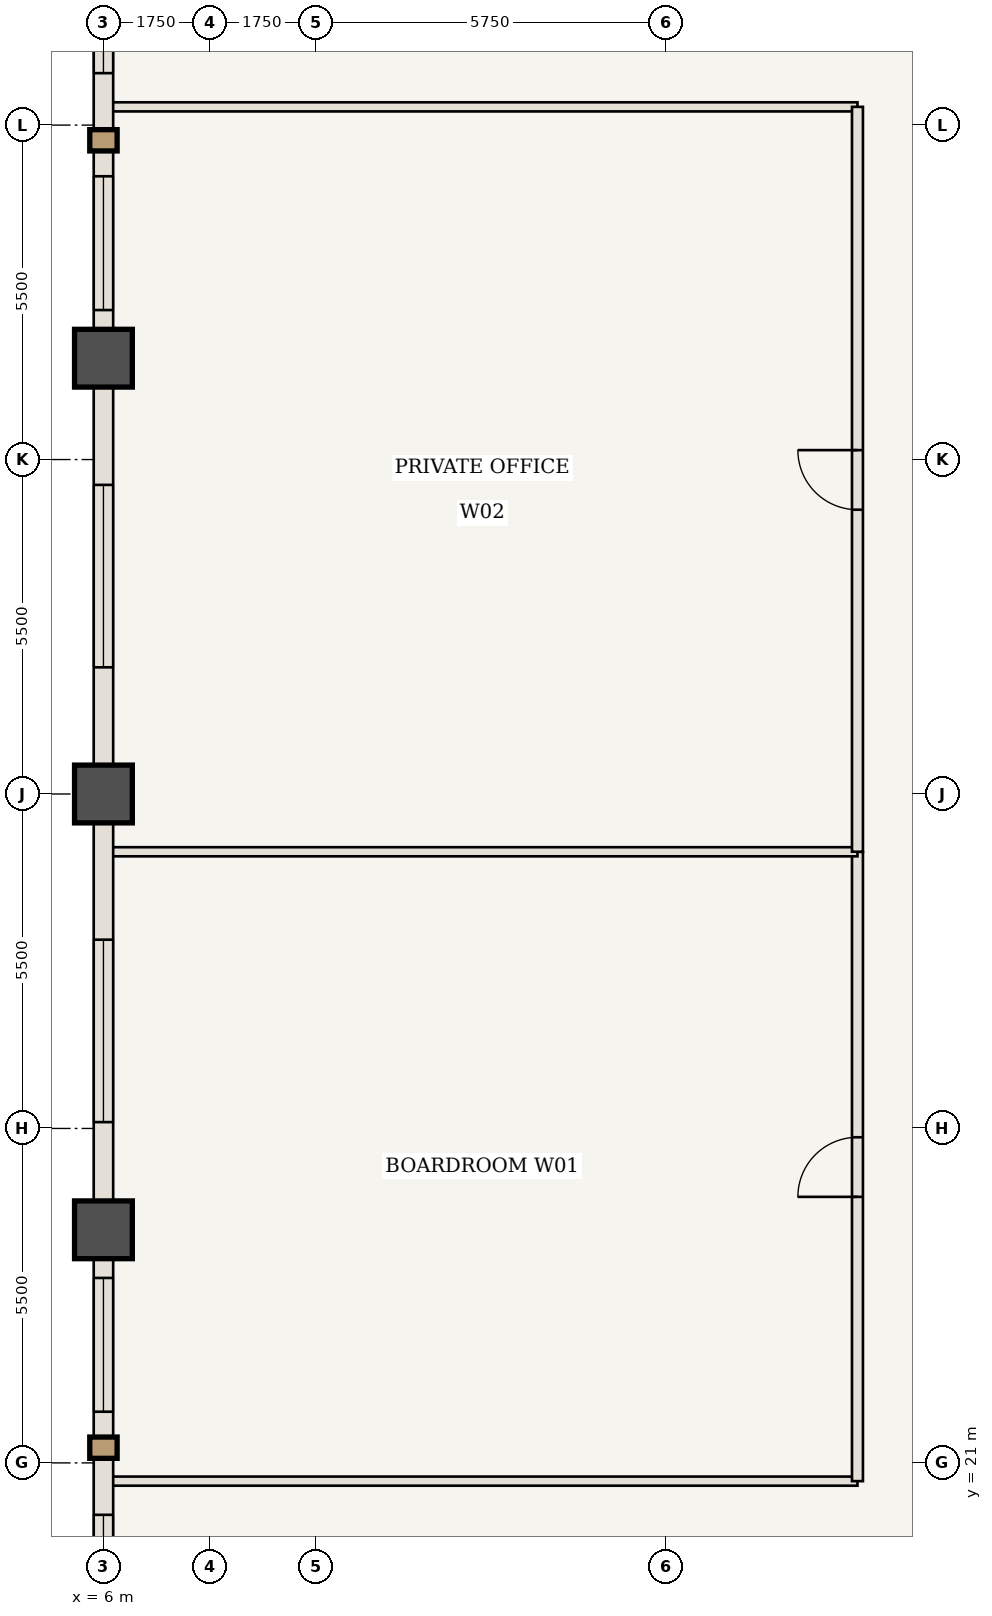
"""IFC4 building model, lengths in metres.
Left out: names, types, materials, properties, quantities, classifications, styles, units other than length and angle.
Written with IfcOpenShell. Run it as: python <this file> out.ifc"""

import sys

from ifc_helpers import new_model, si_unit, direction, frame, frame_2d, origin, origin_2d, place, context, subcontext, project, spatial, rectangle, extrude, element, fill, save


model = new_model("IFC4")
c1 = context("Model", 3, precision=1e-05, world=origin(), true_north=direction((0.0, 1.0)))
c2 = subcontext(c1, "Body", "Model", "MODEL_VIEW")
j1 = project(units=[si_unit("LENGTHUNIT", "METRE"), si_unit("PLANEANGLEUNIT", "RADIAN")], contexts=[c1])
p1 = place(None, origin())
s1 = spatial("IfcSite", under=j1, at=p1, CompositionType="ELEMENT")
p2 = place(p1, origin())
s2 = spatial("IfcBuilding", under=s1, at=p2, CompositionType="ELEMENT")
p3 = place(p2, frame((0.0, 0.0, 114.45)))
s3 = spatial("IfcBuildingStorey", under=s2, at=p3, CompositionType="ELEMENT", Elevation=114.45)
for number, where, z_axis, x_axis in (
    (1, (6.0, 24.833, 0.0), (0.0, 0.0, 1.0), (1.0, 0.0, 0.0)),
    (2, (6.0, 32.0, 0.0), (0.0, 0.0, 1.0), (1.0, 0.0, 0.0)),
    (3, (6.0, 39.167, 0.0), (0.0, 0.0, 1.0), (1.0, 0.0, 0.0)),
):
    element("IfcColumn", number, at=place(p3, frame(where, z_axis=z_axis, x_axis=x_axis)), inside=s3, PredefinedType="COLUMN", context=c2, shape_type="SweptSolid", body=[
        extrude(rectangle(XDim=0.95, YDim=0.95, at=origin_2d()), origin(), (0.0, 0.0, 1.0), 3.85),
    ])
for number, where, z_axis, x_axis in (
    (4, (6.06, 20.7, 0.0), (0.0, 0.0, 1.0), (1.0, 0.0, 0.0)),
    (5, (6.06, 43.3, 0.0), (0.0, 0.0, 1.0), (1.0, 0.0, 0.0)),
):
    element("IfcWall", number, at=place(p3, frame(where, z_axis=z_axis, x_axis=x_axis)), inside=s3, PredefinedType="STANDARD", context=c2, shape_type="SweptSolid", body=[
        extrude(rectangle(XDim=12.34, YDim=0.15, at=frame_2d((6.17, 0.0))), origin(), (0.0, 0.0, 1.0), 3.065),
    ])
p4 = place(p3, frame((18.4, 20.7, 0.0), z_axis=(0.0, 0.0, 1.0), x_axis=(0.0, 1.0, 0.0)))
e6 = element("IfcWall", 6, at=p4, inside=s3, PredefinedType="STANDARD", context=c2, shape_type="SweptSolid", body=[
    extrude(rectangle(XDim=10.35, YDim=0.18, at=frame_2d((5.175, 0.0))), origin(), (0.0, 0.0, 1.0), 3.685),
])
p5 = place(p4, frame((4.675, 0.0, 0.0)))
e7 = element("IfcOpeningElement", 7, at=p5, cuts=e6, PredefinedType="OPENING", context=c2, shape_type="SweptSolid", body=[
    extrude(rectangle(XDim=0.98, YDim=2.2, at=frame_2d((0.49, 1.1))), frame((0.0, 0.1, 0.0), z_axis=(0.0, -1.0, 0.0), x_axis=(1.0, 0.0, 0.0)), (0.0, 0.0, 1.0), 0.2),
])
p6 = place(p3, frame((6.06, 31.05, 0.0), z_axis=(0.0, 0.0, 1.0), x_axis=(1.0, 0.0, 0.0)))
e8 = element("IfcWall", 8, at=p6, inside=s3, PredefinedType="STANDARD", context=c2, shape_type="SweptSolid", body=[
    extrude(rectangle(XDim=12.34, YDim=0.15, at=frame_2d((6.17, 0.0))), origin(), (0.0, 0.0, 1.0), 3.685),
])
p7 = place(p3, frame((18.4, 31.05, 0.0), z_axis=(0.0, 0.0, 1.0), x_axis=(0.0, 1.0, 0.0)))
e9 = element("IfcWall", 9, at=p7, inside=s3, PredefinedType="STANDARD", context=c2, shape_type="SweptSolid", body=[
    extrude(rectangle(XDim=12.25, YDim=0.18, at=frame_2d((6.125, 0.0))), origin(), (0.0, 0.0, 1.0), 3.685),
])
p8 = place(p7, frame((5.625, 0.0, 0.0)))
e10 = element("IfcOpeningElement", 10, at=p8, cuts=e9, PredefinedType="OPENING", context=c2, shape_type="SweptSolid", body=[
    extrude(rectangle(XDim=0.98, YDim=2.2, at=frame_2d((0.49, 1.1))), frame((0.0, 0.1, 0.0), z_axis=(0.0, -1.0, 0.0), x_axis=(1.0, 0.0, 0.0)), (0.0, 0.0, 1.0), 0.2),
])
p9 = place(p3, frame((6.0, 17.667, 0.0), z_axis=(0.0, 0.0, 1.0), x_axis=(0.0, 1.0, 0.0)))
e11 = element("IfcWall", 11, at=p9, inside=s3, PredefinedType="USERDEFINED", context=c2, shape_type="SweptSolid", body=[
    extrude(rectangle(XDim=7.167, YDim=0.32, at=frame_2d((3.583, 0.0))), origin(), (0.0, 0.0, 1.0), 2.885),
])
p10 = place(p9, frame((0.879, 0.0, 0.85)))
e12 = element("IfcOpeningElement", 12, at=p10, cuts=e11, PredefinedType="OPENING", context=c2, shape_type="SweptSolid", body=[
    extrude(rectangle(XDim=1.6, YDim=1.835, at=frame_2d((0.8, 0.917))), frame((0.0, 0.17, 0.0), z_axis=(0.0, -1.0, 0.0), x_axis=(1.0, 0.0, 0.0)), (0.0, 0.0, 1.0), 0.34),
])
p11 = place(p9, frame((4.175, 0.0, 0.85)))
e13 = element("IfcOpeningElement", 13, at=p11, cuts=e11, PredefinedType="OPENING", context=c2, shape_type="SweptSolid", body=[
    extrude(rectangle(XDim=2.2, YDim=1.835, at=frame_2d((1.1, 0.917))), frame((0.0, 0.17, 0.0), z_axis=(0.0, -1.0, 0.0), x_axis=(1.0, 0.0, 0.0)), (0.0, 0.0, 1.0), 0.34),
])
p12 = place(p3, frame((6.0, 24.833, 0.0), z_axis=(0.0, 0.0, 1.0), x_axis=(0.0, 1.0, 0.0)))
e14 = element("IfcWall", 14, at=p12, inside=s3, PredefinedType="USERDEFINED", context=c2, shape_type="SweptSolid", body=[
    extrude(rectangle(XDim=7.167, YDim=0.32, at=frame_2d((3.583, 0.0))), origin(), (0.0, 0.0, 1.0), 2.885),
])
p13 = place(p12, frame((1.771, 0.0, 0.85)))
e15 = element("IfcOpeningElement", 15, at=p13, cuts=e14, PredefinedType="OPENING", context=c2, shape_type="SweptSolid", body=[
    extrude(rectangle(XDim=3.0, YDim=1.835, at=frame_2d((1.5, 0.917))), frame((0.0, 0.17, 0.0), z_axis=(0.0, -1.0, 0.0), x_axis=(1.0, 0.0, 0.0)), (0.0, 0.0, 1.0), 0.34),
])
p14 = place(p3, frame((6.0, 32.0, 0.0), z_axis=(0.0, 0.0, 1.0), x_axis=(0.0, 1.0, 0.0)))
e16 = element("IfcWall", 16, at=p14, inside=s3, PredefinedType="USERDEFINED", context=c2, shape_type="SweptSolid", body=[
    extrude(rectangle(XDim=7.167, YDim=0.32, at=frame_2d((3.583, 0.0))), origin(), (0.0, 0.0, 1.0), 2.885),
])
p15 = place(p14, frame((2.083, 0.0, 0.85)))
e17 = element("IfcOpeningElement", 17, at=p15, cuts=e16, PredefinedType="OPENING", context=c2, shape_type="SweptSolid", body=[
    extrude(rectangle(XDim=3.0, YDim=1.835, at=frame_2d((1.5, 0.917))), frame((0.0, 0.17, 0.0), z_axis=(0.0, -1.0, 0.0), x_axis=(1.0, 0.0, 0.0)), (0.0, 0.0, 1.0), 0.34),
])
p16 = place(p3, frame((6.0, 39.167, 0.0), z_axis=(0.0, 0.0, 1.0), x_axis=(0.0, 1.0, 0.0)))
e18 = element("IfcWall", 18, at=p16, inside=s3, PredefinedType="USERDEFINED", context=c2, shape_type="SweptSolid", body=[
    extrude(rectangle(XDim=7.167, YDim=0.32, at=frame_2d((3.583, 0.0))), origin(), (0.0, 0.0, 1.0), 2.885),
])
p17 = place(p16, frame((0.792, 0.0, 0.85)))
e19 = element("IfcOpeningElement", 19, at=p17, cuts=e18, PredefinedType="OPENING", context=c2, shape_type="SweptSolid", body=[
    extrude(rectangle(XDim=2.2, YDim=1.835, at=frame_2d((1.1, 0.917))), frame((0.0, 0.17, 0.0), z_axis=(0.0, -1.0, 0.0), x_axis=(1.0, 0.0, 0.0)), (0.0, 0.0, 1.0), 0.34),
])
p18 = place(p16, frame((4.688, 0.0, 0.85)))
e20 = element("IfcOpeningElement", 20, at=p18, cuts=e18, PredefinedType="OPENING", context=c2, shape_type="SweptSolid", body=[
    extrude(rectangle(XDim=1.6, YDim=1.835, at=frame_2d((0.8, 0.917))), frame((0.0, 0.17, 0.0), z_axis=(0.0, -1.0, 0.0), x_axis=(1.0, 0.0, 0.0)), (0.0, 0.0, 1.0), 0.34),
])
p19 = place(p5, origin())
e21 = element("IfcDoor", 21, at=p19, inside=s3, OperationType="SINGLE_SWING_LEFT", PredefinedType="DOOR", context=c2, shape_type="SweptSolid", body=[
    extrude(rectangle(XDim=0.98, YDim=2.2, at=frame_2d((0.49, 1.1))), frame((0.0, 0.025, 0.0), z_axis=(0.0, -1.0, 0.0), x_axis=(1.0, 0.0, 0.0)), (0.0, 0.0, 1.0), 0.05),
])
fill(e7, e21)
p20 = place(p8, origin())
e22 = element("IfcDoor", 22, at=p20, inside=s3, OperationType="SINGLE_SWING_RIGHT", PredefinedType="DOOR", context=c2, shape_type="SweptSolid", body=[
    extrude(rectangle(XDim=0.98, YDim=2.2, at=frame_2d((0.49, 1.1))), frame((0.0, 0.025, 0.0), z_axis=(0.0, -1.0, 0.0), x_axis=(1.0, 0.0, 0.0)), (0.0, 0.0, 1.0), 0.05),
])
fill(e10, e22)
p21 = place(p10, origin())
e23 = element("IfcWindow", 23, at=p21, inside=s3, PartitioningType="SINGLE_PANEL", PredefinedType="WINDOW", context=c2, shape_type="SweptSolid", body=[
    extrude(rectangle(XDim=1.6, YDim=1.835, at=frame_2d((0.8, 0.917))), frame((0.0, 0.03, 0.0), z_axis=(0.0, -1.0, 0.0), x_axis=(1.0, 0.0, 0.0)), (0.0, 0.0, 1.0), 0.06),
])
fill(e12, e23)
p22 = place(p11, origin())
e24 = element("IfcWindow", 24, at=p22, inside=s3, PartitioningType="SINGLE_PANEL", PredefinedType="WINDOW", context=c2, shape_type="SweptSolid", body=[
    extrude(rectangle(XDim=2.2, YDim=1.835, at=frame_2d((1.1, 0.917))), frame((0.0, 0.03, 0.0), z_axis=(0.0, -1.0, 0.0), x_axis=(1.0, 0.0, 0.0)), (0.0, 0.0, 1.0), 0.06),
])
fill(e13, e24)
p23 = place(p13, origin())
e25 = element("IfcWindow", 25, at=p23, inside=s3, PartitioningType="SINGLE_PANEL", PredefinedType="WINDOW", context=c2, shape_type="SweptSolid", body=[
    extrude(rectangle(XDim=3.0, YDim=1.835, at=frame_2d((1.5, 0.917))), frame((0.0, 0.03, 0.0), z_axis=(0.0, -1.0, 0.0), x_axis=(1.0, 0.0, 0.0)), (0.0, 0.0, 1.0), 0.06),
])
fill(e15, e25)
p24 = place(p15, origin())
e26 = element("IfcWindow", 26, at=p24, inside=s3, PartitioningType="SINGLE_PANEL", PredefinedType="WINDOW", context=c2, shape_type="SweptSolid", body=[
    extrude(rectangle(XDim=3.0, YDim=1.835, at=frame_2d((1.5, 0.917))), frame((0.0, 0.03, 0.0), z_axis=(0.0, -1.0, 0.0), x_axis=(1.0, 0.0, 0.0)), (0.0, 0.0, 1.0), 0.06),
])
fill(e17, e26)
p25 = place(p17, origin())
e27 = element("IfcWindow", 27, at=p25, inside=s3, PartitioningType="SINGLE_PANEL", PredefinedType="WINDOW", context=c2, shape_type="SweptSolid", body=[
    extrude(rectangle(XDim=2.2, YDim=1.835, at=frame_2d((1.1, 0.917))), frame((0.0, 0.03, 0.0), z_axis=(0.0, -1.0, 0.0), x_axis=(1.0, 0.0, 0.0)), (0.0, 0.0, 1.0), 0.06),
])
fill(e19, e27)
p26 = place(p18, origin())
e28 = element("IfcWindow", 28, at=p26, inside=s3, PartitioningType="SINGLE_PANEL", PredefinedType="WINDOW", context=c2, shape_type="SweptSolid", body=[
    extrude(rectangle(XDim=1.6, YDim=1.835, at=frame_2d((0.8, 0.917))), frame((0.0, 0.03, 0.0), z_axis=(0.0, -1.0, 0.0), x_axis=(1.0, 0.0, 0.0)), (0.0, 0.0, 1.0), 0.06),
])
fill(e20, e28)
save(model, sys.argv[1])
